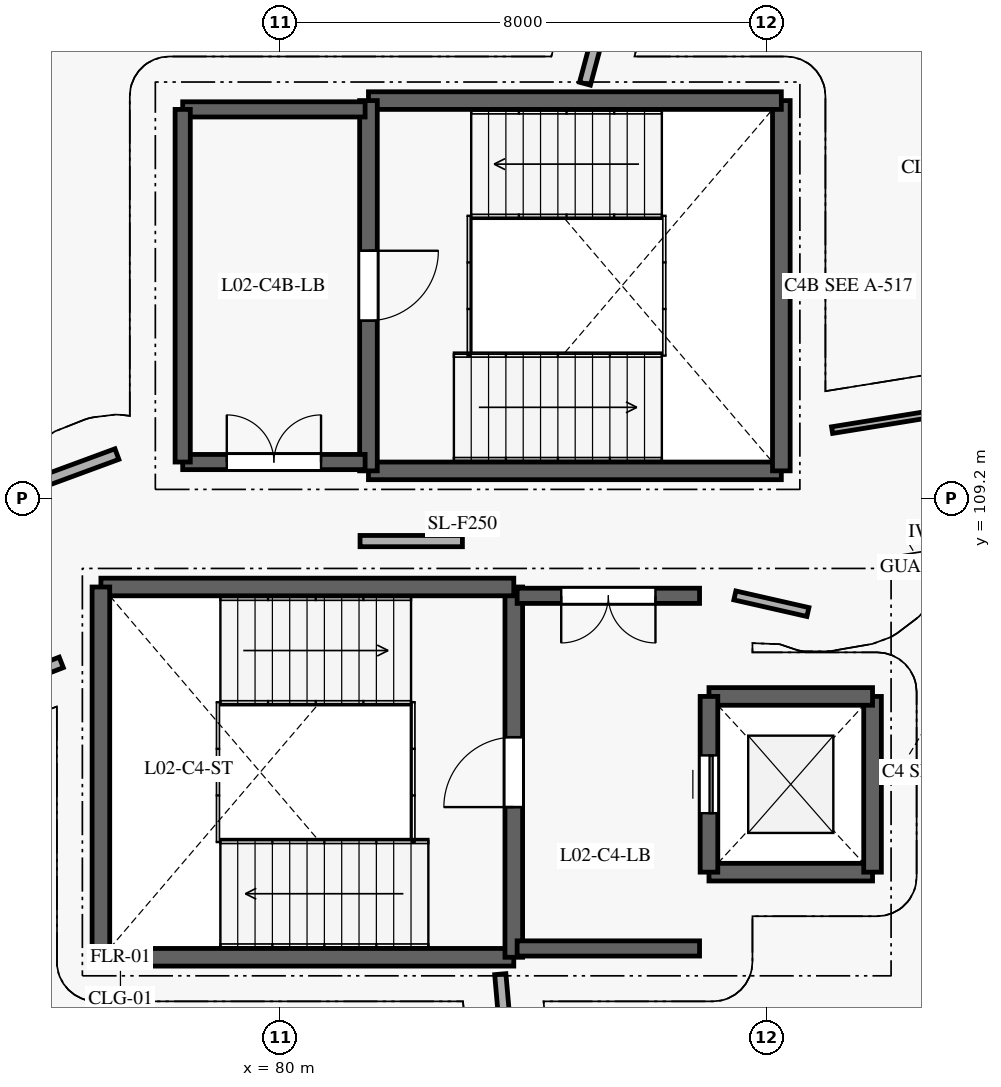
"""IFC4 building model, lengths in metres.
Left out: names, types, materials, properties, quantities, classifications, styles, units other than length and angle.
Written with IfcOpenShell. Run it as: python <this file> out.ifc"""

import sys

from ifc_helpers import new_model, si_unit, direction, frame, frame_2d, origin, place, context, subcontext, project, spatial, rectangle, extrude, element, fill, save


model = new_model("IFC4")
c1 = context("Model", 3, precision=1e-05, world=origin(), true_north=direction((0.0, 1.0)))
c2 = subcontext(c1, "Body", "Model", "MODEL_VIEW")
j1 = project(units=[si_unit("LENGTHUNIT", "METRE"), si_unit("PLANEANGLEUNIT", "RADIAN")], contexts=[c1])
p1 = place(None, origin())
s1 = spatial("IfcSite", under=j1, at=p1, CompositionType="ELEMENT")
p2 = place(p1, origin())
s2 = spatial("IfcBuilding", under=s1, at=p2, CompositionType="ELEMENT")
p3 = place(p2, frame((0.0, 0.0, 8.4)))
s3 = spatial("IfcBuildingStorey", under=s2, at=p3, CompositionType="ELEMENT", Elevation=8.4)
p4 = place(p3, frame((89.75, 120.396, 0.0), z_axis=(0.0, 0.0, 1.0), x_axis=(0.738102453677, -0.674688645136, 0.0)))
e1 = element("IfcWall", 1, at=p4, inside=s3, PredefinedType="SOLIDWALL", context=c2, shape_type="SweptSolid", body=[
    extrude(rectangle(XDim=7.122, YDim=0.325, at=frame_2d((3.561, 0.0))), origin(), (0.0, 0.0, 1.0), 3.94),
])
p5 = place(p4, frame((1.031, 0.0, 0.85)))
e2 = element("IfcOpeningElement", 2, at=p5, cuts=e1, PredefinedType="OPENING", context=c2, shape_type="SweptSolid", body=[
    extrude(rectangle(XDim=1.5, YDim=1.3, at=frame_2d((0.75, 0.65))), frame((0.0, 0.172, 0.0), z_axis=(0.0, -1.0, 0.0), x_axis=(1.0, 0.0, 0.0)), (0.0, 0.0, 1.0), 0.345),
])
p6 = place(p4, frame((3.911, 0.0, 0.85)))
e3 = element("IfcOpeningElement", 3, at=p6, cuts=e1, PredefinedType="OPENING", context=c2, shape_type="SweptSolid", body=[
    extrude(rectangle(XDim=0.85, YDim=1.4, at=frame_2d((0.425, 0.7))), frame((0.0, 0.172, 0.0), z_axis=(0.0, -1.0, 0.0), x_axis=(1.0, 0.0, 0.0)), (0.0, 0.0, 1.0), 0.345),
])
p7 = place(p3, frame((77.055, 101.655, 0.0), z_axis=(0.0, 0.0, 1.0), x_axis=(1.0, 0.0, 0.0)))
e4 = element("IfcWall", 4, at=p7, inside=s3, PredefinedType="SHEAR", context=c2, shape_type="SweptSolid", body=[
    extrude(rectangle(XDim=6.79, YDim=0.29, at=frame_2d((3.395, 0.0))), origin(), (0.0, 0.0, 1.0), 3.95),
])
p8 = place(p3, frame((83.845, 101.655, 0.0), z_axis=(0.0, 0.0, 1.0), x_axis=(0.0, 1.0, 0.0)))
e5 = element("IfcWall", 5, at=p8, inside=s3, PredefinedType="SHEAR", context=c2, shape_type="SweptSolid", body=[
    extrude(rectangle(XDim=6.09, YDim=0.29, at=frame_2d((3.045, 0.0))), origin(), (0.0, 0.0, 1.0), 3.95),
])
p9 = place(p8, frame((2.47, 0.0, 0.0)))
e6 = element("IfcOpeningElement", 6, at=p9, cuts=e5, PredefinedType="OPENING", context=c2, shape_type="SweptSolid", body=[
    extrude(rectangle(XDim=1.15, YDim=2.1, at=frame_2d((0.575, 1.05))), frame((0.0, 0.155, 0.0), z_axis=(0.0, -1.0, 0.0), x_axis=(1.0, 0.0, 0.0)), (0.0, 0.0, 1.0), 0.31),
])
p10 = place(p3, frame((83.845, 107.745, 0.0), z_axis=(0.0, 0.0, 1.0), x_axis=(-1.0, 0.0, 0.0)))
e7 = element("IfcWall", 7, at=p10, inside=s3, PredefinedType="SHEAR", context=c2, shape_type="SweptSolid", body=[
    extrude(rectangle(XDim=6.79, YDim=0.29, at=frame_2d((3.395, 0.0))), origin(), (0.0, 0.0, 1.0), 3.95),
])
p11 = place(p3, frame((77.055, 107.745, 0.0), z_axis=(0.0, 0.0, 1.0), x_axis=(0.0, -1.0, 0.0)))
e8 = element("IfcWall", 8, at=p11, inside=s3, PredefinedType="SHEAR", context=c2, shape_type="SweptSolid", body=[
    extrude(rectangle(XDim=6.09, YDim=0.29, at=frame_2d((3.045, 0.0))), origin(), (0.0, 0.0, 1.0), 3.95),
])
p12 = place(p3, frame((87.055, 103.055, 0.0), z_axis=(0.0, 0.0, 1.0), x_axis=(1.0, 0.0, 0.0)))
e9 = element("IfcWall", 9, at=p12, inside=s3, PredefinedType="SHEAR", context=c2, shape_type="SweptSolid", body=[
    extrude(rectangle(XDim=2.69, YDim=0.29, at=frame_2d((1.345, 0.0))), origin(), (0.0, 0.0, 1.0), 3.95),
])
p13 = place(p3, frame((89.745, 103.055, 0.0), z_axis=(0.0, 0.0, 1.0), x_axis=(0.0, 1.0, 0.0)))
e10 = element("IfcWall", 10, at=p13, inside=s3, PredefinedType="SHEAR", context=c2, shape_type="SweptSolid", body=[
    extrude(rectangle(XDim=2.89, YDim=0.29, at=frame_2d((1.445, 0.0))), origin(), (0.0, 0.0, 1.0), 3.95),
])
p14 = place(p3, frame((89.745, 105.945, 0.0), z_axis=(0.0, 0.0, 1.0), x_axis=(-1.0, 0.0, 0.0)))
e11 = element("IfcWall", 11, at=p14, inside=s3, PredefinedType="SHEAR", context=c2, shape_type="SweptSolid", body=[
    extrude(rectangle(XDim=2.69, YDim=0.29, at=frame_2d((1.345, 0.0))), origin(), (0.0, 0.0, 1.0), 3.95),
])
p15 = place(p3, frame((87.055, 105.945, 0.0), z_axis=(0.0, 0.0, 1.0), x_axis=(0.0, -1.0, 0.0)))
e12 = element("IfcWall", 12, at=p15, inside=s3, PredefinedType="SHEAR", context=c2, shape_type="SweptSolid", body=[
    extrude(rectangle(XDim=2.89, YDim=0.29, at=frame_2d((1.445, 0.0))), origin(), (0.0, 0.0, 1.0), 3.95),
])
p16 = place(p15, frame((0.97, 0.0, 0.0)))
e13 = element("IfcOpeningElement", 13, at=p16, cuts=e12, PredefinedType="OPENING", context=c2, shape_type="SweptSolid", body=[
    extrude(rectangle(XDim=0.95, YDim=2.1, at=frame_2d((0.475, 1.05))), frame((0.0, 0.155, 0.0), z_axis=(0.0, -1.0, 0.0), x_axis=(1.0, 0.0, 0.0)), (0.0, 0.0, 1.0), 0.31),
])
p17 = place(p3, frame((83.9, 101.8, 0.0), z_axis=(0.0, 0.0, 1.0), x_axis=(1.0, 0.0, 0.0)))
e14 = element("IfcWall", 14, at=p17, inside=s3, PredefinedType="SHEAR", context=c2, shape_type="SweptSolid", body=[
    extrude(rectangle(XDim=3.0, YDim=0.25, at=frame_2d((1.5, 0.0))), origin(), (0.0, 0.0, 1.0), 3.95),
])
p18 = place(p3, frame((86.9, 107.6, 0.0), z_axis=(0.0, 0.0, 1.0), x_axis=(-1.0, 0.0, 0.0)))
e15 = element("IfcWall", 15, at=p18, inside=s3, PredefinedType="SHEAR", context=c2, shape_type="SweptSolid", body=[
    extrude(rectangle(XDim=3.0, YDim=0.25, at=frame_2d((1.5, 0.0))), origin(), (0.0, 0.0, 1.0), 3.95),
])
p19 = place(p18, frame((0.725, 0.0, 0.0)))
e16 = element("IfcOpeningElement", 16, at=p19, cuts=e15, PredefinedType="OPENING", context=c2, shape_type="SweptSolid", body=[
    extrude(rectangle(XDim=1.55, YDim=2.15, at=frame_2d((0.775, 1.075))), frame((0.0, 0.135, 0.0), z_axis=(0.0, -1.0, 0.0), x_axis=(1.0, 0.0, 0.0)), (0.0, 0.0, 1.0), 0.27),
])
p20 = place(p3, frame((81.455, 109.655, 0.0), z_axis=(0.0, 0.0, 1.0), x_axis=(1.0, 0.0, 0.0)))
e17 = element("IfcWall", 17, at=p20, inside=s3, PredefinedType="SHEAR", context=c2, shape_type="SweptSolid", body=[
    extrude(rectangle(XDim=6.79, YDim=0.29, at=frame_2d((3.395, 0.0))), origin(), (0.0, 0.0, 1.0), 3.95),
])
p21 = place(p3, frame((88.245, 109.655, 0.0), z_axis=(0.0, 0.0, 1.0), x_axis=(0.0, 1.0, 0.0)))
e18 = element("IfcWall", 18, at=p21, inside=s3, PredefinedType="SHEAR", context=c2, shape_type="SweptSolid", body=[
    extrude(rectangle(XDim=6.09, YDim=0.29, at=frame_2d((3.045, 0.0))), origin(), (0.0, 0.0, 1.0), 3.95),
])
p22 = place(p3, frame((88.245, 115.745, 0.0), z_axis=(0.0, 0.0, 1.0), x_axis=(-1.0, 0.0, 0.0)))
e19 = element("IfcWall", 19, at=p22, inside=s3, PredefinedType="SHEAR", context=c2, shape_type="SweptSolid", body=[
    extrude(rectangle(XDim=6.79, YDim=0.29, at=frame_2d((3.395, 0.0))), origin(), (0.0, 0.0, 1.0), 3.95),
])
p23 = place(p3, frame((81.455, 115.745, 0.0), z_axis=(0.0, 0.0, 1.0), x_axis=(0.0, -1.0, 0.0)))
e20 = element("IfcWall", 20, at=p23, inside=s3, PredefinedType="SHEAR", context=c2, shape_type="SweptSolid", body=[
    extrude(rectangle(XDim=6.09, YDim=0.29, at=frame_2d((3.045, 0.0))), origin(), (0.0, 0.0, 1.0), 3.95),
])
p24 = place(p23, frame((2.47, 0.0, 0.0)))
e21 = element("IfcOpeningElement", 21, at=p24, cuts=e20, PredefinedType="OPENING", context=c2, shape_type="SweptSolid", body=[
    extrude(rectangle(XDim=1.15, YDim=2.1, at=frame_2d((0.575, 1.05))), frame((0.0, 0.155, 0.0), z_axis=(0.0, -1.0, 0.0), x_axis=(1.0, 0.0, 0.0)), (0.0, 0.0, 1.0), 0.31),
])
p25 = place(p3, frame((78.4, 109.8, 0.0), z_axis=(0.0, 0.0, 1.0), x_axis=(1.0, 0.0, 0.0)))
e22 = element("IfcWall", 22, at=p25, inside=s3, PredefinedType="SHEAR", context=c2, shape_type="SweptSolid", body=[
    extrude(rectangle(XDim=3.0, YDim=0.25, at=frame_2d((1.5, 0.0))), origin(), (0.0, 0.0, 1.0), 3.95),
])
p26 = place(p25, frame((0.725, 0.0, 0.0)))
e23 = element("IfcOpeningElement", 23, at=p26, cuts=e22, PredefinedType="OPENING", context=c2, shape_type="SweptSolid", body=[
    extrude(rectangle(XDim=1.55, YDim=2.15, at=frame_2d((0.775, 1.075))), frame((0.0, 0.135, 0.0), z_axis=(0.0, -1.0, 0.0), x_axis=(1.0, 0.0, 0.0)), (0.0, 0.0, 1.0), 0.27),
])
p27 = place(p3, frame((81.4, 115.6, 0.0), z_axis=(0.0, 0.0, 1.0), x_axis=(-1.0, 0.0, 0.0)))
e24 = element("IfcWall", 24, at=p27, inside=s3, PredefinedType="SHEAR", context=c2, shape_type="SweptSolid", body=[
    extrude(rectangle(XDim=3.0, YDim=0.25, at=frame_2d((1.5, 0.0))), origin(), (0.0, 0.0, 1.0), 3.95),
])
p28 = place(p3, frame((78.4, 115.6, 0.0), z_axis=(0.0, 0.0, 1.0), x_axis=(0.0, -1.0, 0.0)))
e25 = element("IfcWall", 25, at=p28, inside=s3, PredefinedType="SHEAR", context=c2, shape_type="SweptSolid", body=[
    extrude(rectangle(XDim=5.8, YDim=0.25, at=frame_2d((2.9, 0.0))), origin(), (0.0, 0.0, 1.0), 3.95),
])
p29 = place(p3, frame((81.317, 108.5, 0.0), z_axis=(0.0, 0.0, 1.0), x_axis=(1.0, 0.0, 0.0)))
e26 = element("IfcWall", 26, at=p29, inside=s3, PredefinedType="PARTITIONING", context=c2, shape_type="SweptSolid", body=[
    extrude(rectangle(XDim=1.683, YDim=0.185, at=frame_2d((0.842, 0.0))), origin(), (0.0, 0.0, 1.0), 3.94),
])
p30 = place(p3, frame((85.016, 116.022, 0.0), z_axis=(0.0, 0.0, 1.0), x_axis=(0.258804170678, 0.965929811756, 0.0)))
e27 = element("IfcWall", 27, at=p30, inside=s3, PredefinedType="PARTITIONING", context=c2, shape_type="SweptSolid", body=[
    extrude(rectangle(XDim=5.377, YDim=0.185, at=frame_2d((2.688, 0.0))), origin(), (0.0, 0.0, 1.0), 3.94),
])
p31 = place(p30, frame((2.009, 0.0, 0.0)))
e28 = element("IfcOpeningElement", 28, at=p31, cuts=e27, PredefinedType="OPENING", context=c2, shape_type="SweptSolid", body=[
    extrude(rectangle(XDim=1.36, YDim=2.14, at=frame_2d((0.68, 1.07))), frame((0.0, 0.103, 0.0), z_axis=(0.0, -1.0, 0.0), x_axis=(1.0, 0.0, 0.0)), (0.0, 0.0, 1.0), 0.205),
])
p32 = place(p3, frame((73.67, 108.586, 0.0), z_axis=(0.0, 0.0, 1.0), x_axis=(0.938293786345, 0.345839226384, 0.0)))
e29 = element("IfcWall", 29, at=p32, inside=s3, PredefinedType="PARTITIONING", context=c2, shape_type="SweptSolid", body=[
    extrude(rectangle(XDim=3.888, YDim=0.185, at=frame_2d((1.944, 0.0))), origin(), (0.0, 0.0, 1.0), 3.94),
])
p33 = place(p3, frame((76.403, 106.505, 0.0), z_axis=(0.0, 0.0, 1.0), x_axis=(-0.931801101999, -0.362969291145, 0.0)))
e30 = element("IfcWall", 30, at=p33, inside=s3, PredefinedType="PARTITIONING", context=c2, shape_type="SweptSolid", body=[
    extrude(rectangle(XDim=5.518, YDim=0.185, at=frame_2d((2.759, 0.0))), origin(), (0.0, 0.0, 1.0), 3.94),
])
p34 = place(p3, frame((84.147, 95.392, 0.0), z_axis=(0.0, 0.0, 1.0), x_axis=(-0.087194167802, 0.996191335588, 0.0)))
e31 = element("IfcWall", 31, at=p34, inside=s3, PredefinedType="PARTITIONING", context=c2, shape_type="SweptSolid", body=[
    extrude(rectangle(XDim=6.009, YDim=0.185, at=frame_2d((3.004, 0.0))), origin(), (0.0, 0.0, 1.0), 3.94),
])
p35 = place(p34, frame((2.365, 0.0, 0.0)))
e32 = element("IfcOpeningElement", 32, at=p35, cuts=e31, PredefinedType="OPENING", context=c2, shape_type="SweptSolid", body=[
    extrude(rectangle(XDim=1.28, YDim=2.14, at=frame_2d((0.64, 1.07))), frame((0.0, 0.103, 0.0), z_axis=(0.0, -1.0, 0.0), x_axis=(1.0, 0.0, 0.0)), (0.0, 0.0, 1.0), 0.205),
])
p36 = place(p3, frame((91.402, 107.896, 0.0), z_axis=(0.0, 0.0, 1.0), x_axis=(-0.993757546788, 0.111561365189, 0.0)))
e33 = element("IfcWall", 33, at=p36, inside=s3, PredefinedType="PARTITIONING", context=c2, shape_type="SweptSolid", body=[
    extrude(rectangle(XDim=1.162, YDim=0.15, at=frame_2d((0.581, 0.0))), origin(), (0.0, 0.0, 1.0), 3.94),
])
p37 = place(p3, frame((88.682, 107.333, 0.0), z_axis=(0.0, 0.0, 1.0), x_axis=(-0.975140642982, 0.221586837165, 0.0)))
e34 = element("IfcWall", 34, at=p37, inside=s3, PredefinedType="PARTITIONING", context=c2, shape_type="SweptSolid", body=[
    extrude(rectangle(XDim=1.232, YDim=0.15, at=frame_2d((0.616, 0.0))), origin(), (0.0, 0.0, 1.0), 3.94),
])
p38 = place(p3, frame((89.08, 110.325, 0.0), z_axis=(0.0, 0.0, 1.0), x_axis=(0.987210081252, 0.159424764309, 0.0)))
e35 = element("IfcWall", 35, at=p38, inside=s3, PredefinedType="PARTITIONING", context=c2, shape_type="SweptSolid", body=[
    extrude(rectangle(XDim=6.505, YDim=0.11, at=frame_2d((3.253, 0.0))), origin(), (0.0, 0.0, 1.0), 3.94),
])
p39 = place(p38, frame((2.713, 0.0, 0.0)))
e36 = element("IfcOpeningElement", 36, at=p39, cuts=e35, PredefinedType="OPENING", context=c2, shape_type="SweptSolid", body=[
    extrude(rectangle(XDim=1.08, YDim=2.12, at=frame_2d((0.54, 1.06))), frame((0.0, 0.065, 0.0), z_axis=(0.0, -1.0, 0.0), x_axis=(1.0, 0.0, 0.0)), (0.0, 0.0, 1.0), 0.13),
])
p40 = place(p9, origin())
e37 = element("IfcDoor", 37, at=p40, inside=s3, OperationType="SINGLE_SWING_LEFT", PredefinedType="DOOR", context=c2, shape_type="SweptSolid", body=[
    extrude(rectangle(XDim=1.15, YDim=2.1, at=frame_2d((0.575, 1.05))), frame((0.0, 0.025, 0.0), z_axis=(0.0, -1.0, 0.0), x_axis=(1.0, 0.0, 0.0)), (0.0, 0.0, 1.0), 0.05),
])
fill(e6, e37)
p41 = place(p16, frame((0.95, 0.0, 0.0), z_axis=(0.0, 0.0, 1.0), x_axis=(-1.0, 0.0, 0.0)))
e38 = element("IfcDoor", 38, at=p41, inside=s3, OperationType="SLIDING_TO_LEFT", PredefinedType="DOOR", context=c2, shape_type="SweptSolid", body=[
    extrude(rectangle(XDim=0.95, YDim=2.1, at=frame_2d((0.475, 1.05))), frame((0.0, 0.025, 0.0), z_axis=(0.0, -1.0, 0.0), x_axis=(1.0, 0.0, 0.0)), (0.0, 0.0, 1.0), 0.05),
])
fill(e13, e38)
p42 = place(p19, origin())
e39 = element("IfcDoor", 39, at=p42, inside=s3, OperationType="DOUBLE_DOOR_SINGLE_SWING", PredefinedType="DOOR", context=c2, shape_type="SweptSolid", body=[
    extrude(rectangle(XDim=1.55, YDim=2.15, at=frame_2d((0.775, 1.075))), frame((0.0, 0.025, 0.0), z_axis=(0.0, -1.0, 0.0), x_axis=(1.0, 0.0, 0.0)), (0.0, 0.0, 1.0), 0.05),
])
fill(e16, e39)
p43 = place(p24, origin())
e40 = element("IfcDoor", 40, at=p43, inside=s3, OperationType="SINGLE_SWING_LEFT", PredefinedType="DOOR", context=c2, shape_type="SweptSolid", body=[
    extrude(rectangle(XDim=1.15, YDim=2.1, at=frame_2d((0.575, 1.05))), frame((0.0, 0.025, 0.0), z_axis=(0.0, -1.0, 0.0), x_axis=(1.0, 0.0, 0.0)), (0.0, 0.0, 1.0), 0.05),
])
fill(e21, e40)
p44 = place(p26, origin())
e41 = element("IfcDoor", 41, at=p44, inside=s3, OperationType="DOUBLE_DOOR_SINGLE_SWING", PredefinedType="DOOR", context=c2, shape_type="SweptSolid", body=[
    extrude(rectangle(XDim=1.55, YDim=2.15, at=frame_2d((0.775, 1.075))), frame((0.0, 0.025, 0.0), z_axis=(0.0, -1.0, 0.0), x_axis=(1.0, 0.0, 0.0)), (0.0, 0.0, 1.0), 0.05),
])
fill(e23, e41)
save(model, sys.argv[1])
